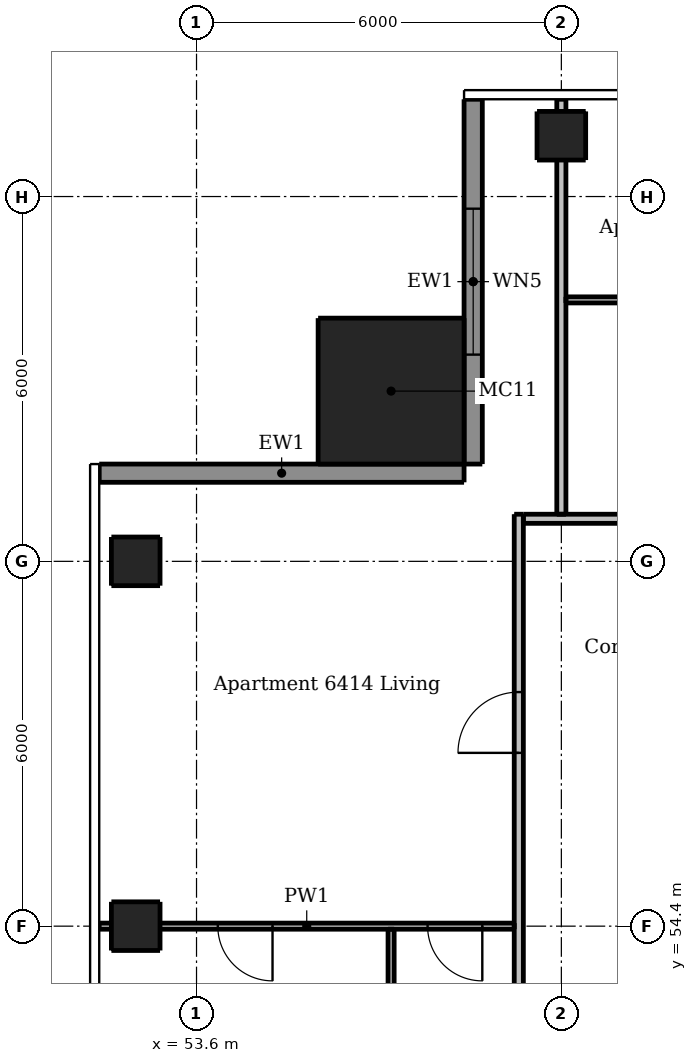
"""IFC4 building model, lengths in metres.
Left out: names, types, materials, properties, quantities, classifications, styles, units other than length and angle.
Written with IfcOpenShell. Run it as: python <this file> out.ifc"""

import sys

from ifc_helpers import new_model, si_unit, direction, frame, frame_2d, origin, origin_2d, place, context, subcontext, project, spatial, rectangle, extrude, element, fill, save


model = new_model("IFC4")
c1 = context("Model", 3, precision=1e-05, world=origin(), true_north=direction((0.0, 1.0)))
c2 = subcontext(c1, "Body", "Model", "MODEL_VIEW")
j1 = project(units=[si_unit("LENGTHUNIT", "METRE"), si_unit("PLANEANGLEUNIT", "RADIAN")], contexts=[c1])
p1 = place(None, origin())
s1 = spatial("IfcSite", under=j1, at=p1, CompositionType="ELEMENT")
p2 = place(p1, origin())
s2 = spatial("IfcBuilding", under=s1, at=p2, CompositionType="ELEMENT")
p3 = place(p2, frame((0.0, 0.0, 242.2)))
s3 = spatial("IfcBuildingStorey", under=s2, at=p3, CompositionType="ELEMENT", Elevation=242.2)
for number, where, z_axis, x_axis in (
    (1, (59.6, 67.4, 0.0), (0.0, 0.0, 1.0), (1.0, 0.0, 0.0)),
    (2, (52.6, 54.4, 0.0), (0.0, 0.0, 1.0), (1.0, 0.0, 0.0)),
    (3, (52.6, 60.4, 0.0), (0.0, 0.0, 1.0), (1.0, 0.0, 0.0)),
):
    element("IfcColumn", number, at=place(p3, frame(where, z_axis=z_axis, x_axis=x_axis)), inside=s3, PredefinedType="COLUMN", context=c2, shape_type="SweptSolid", body=[
        extrude(rectangle(XDim=0.8, YDim=0.8, at=origin_2d()), origin(), (0.0, 0.0, 1.0), 3.05),
    ])
p4 = place(p3, frame((56.8, 63.2, 0.0), z_axis=(0.0, 0.0, 1.0), x_axis=(1.0, 0.0, 0.0)))
e4 = element("IfcColumn", 4, at=p4, inside=s3, PredefinedType="COLUMN", context=c2, shape_type="SweptSolid", body=[
    extrude(rectangle(XDim=2.4, YDim=2.4, at=origin_2d()), origin(), (0.0, 0.0, 1.0), 3.3),
])
p5 = place(p3, frame((58.15, 68.0, 0.0), z_axis=(0.0, 0.0, 1.0), x_axis=(0.0, -1.0, 0.0)))
e5 = element("IfcWall", 5, at=p5, inside=s3, PredefinedType="SOLIDWALL", context=c2, shape_type="SweptSolid", body=[
    extrude(rectangle(XDim=6.0, YDim=0.3, at=frame_2d((3.0, 0.0))), origin(), (0.0, 0.0, 1.0), 3.05),
])
p6 = place(p5, frame((1.8, 0.0, 0.15)))
e6 = element("IfcOpeningElement", 6, at=p6, cuts=e5, PredefinedType="OPENING", context=c2, shape_type="SweptSolid", body=[
    extrude(rectangle(XDim=2.4, YDim=2.1, at=frame_2d((1.2, 1.05))), frame((0.0, 0.16, 0.0), z_axis=(0.0, -1.0, 0.0), x_axis=(1.0, 0.0, 0.0)), (0.0, 0.0, 1.0), 0.32),
])
p7 = place(p3, frame((58.0, 61.85, 0.0), z_axis=(0.0, 0.0, 1.0), x_axis=(-1.0, 0.0, 0.0)))
e7 = element("IfcWall", 7, at=p7, inside=s3, PredefinedType="SOLIDWALL", context=c2, shape_type="SweptSolid", body=[
    extrude(rectangle(XDim=6.0, YDim=0.3, at=frame_2d((3.0, 0.0))), origin(), (0.0, 0.0, 1.0), 3.05),
])
p8 = place(p3, frame((56.8, 54.35, 0.0), z_axis=(0.0, 0.0, 1.0), x_axis=(0.0, -1.0, 0.0)))
e8 = element("IfcWall", 8, at=p8, inside=s3, PredefinedType="PARTITIONING", context=c2, shape_type="SweptSolid", body=[
    extrude(rectangle(XDim=5.875, YDim=0.1, at=frame_2d((2.938, 0.0))), origin(), (0.0, 0.0, 1.0), 3.05),
])
p9 = place(p8, frame((3.75, 0.0, 0.0)))
e9 = element("IfcOpeningElement", 9, at=p9, cuts=e8, PredefinedType="OPENING", context=c2, shape_type="SweptSolid", body=[
    extrude(rectangle(XDim=0.8, YDim=2.1, at=frame_2d((0.4, 1.05))), frame((0.0, 0.06, 0.0), z_axis=(0.0, -1.0, 0.0), x_axis=(1.0, 0.0, 0.0)), (0.0, 0.0, 1.0), 0.12),
])
p10 = place(p3, frame((59.675, 64.7, 0.0), z_axis=(0.0, 0.0, 1.0), x_axis=(1.0, 0.0, 0.0)))
e10 = element("IfcWall", 10, at=p10, inside=s3, PredefinedType="PARTITIONING", context=c2, shape_type="SweptSolid", body=[
    extrude(rectangle(XDim=1.975, YDim=0.1, at=frame_2d((0.987, 0.0))), origin(), (0.0, 0.0, 1.0), 3.05),
])
p11 = place(p3, frame((58.825, 54.4, 0.0), z_axis=(0.0, 0.0, 1.0), x_axis=(-1.0, 0.0, 0.0)))
e11 = element("IfcWall", 11, at=p11, inside=s3, PredefinedType="PARTITIONING", context=c2, shape_type="SweptSolid", body=[
    extrude(rectangle(XDim=6.825, YDim=0.1, at=frame_2d((3.413, 0.0))), origin(), (0.0, 0.0, 1.0), 2.516),
])
p12 = place(p11, frame((0.525, 0.0, 0.0)))
e12 = element("IfcOpeningElement", 12, at=p12, cuts=e11, PredefinedType="OPENING", context=c2, shape_type="SweptSolid", body=[
    extrude(rectangle(XDim=0.9, YDim=2.1, at=frame_2d((0.45, 1.05))), frame((0.0, 0.06, 0.0), z_axis=(0.0, -1.0, 0.0), x_axis=(1.0, 0.0, 0.0)), (0.0, 0.0, 1.0), 0.12),
])
p13 = place(p11, frame((3.975, 0.0, 0.0)))
e13 = element("IfcOpeningElement", 13, at=p13, cuts=e11, PredefinedType="OPENING", context=c2, shape_type="SweptSolid", body=[
    extrude(rectangle(XDim=0.9, YDim=2.1, at=frame_2d((0.45, 1.05))), frame((0.0, 0.06, 0.0), z_axis=(0.0, -1.0, 0.0), x_axis=(1.0, 0.0, 0.0)), (0.0, 0.0, 1.0), 0.12),
])
p14 = place(p3, frame((58.9, 30.325, 0.0), z_axis=(0.0, 0.0, 1.0), x_axis=(0.0, 1.0, 0.0)))
e14 = element("IfcWall", 14, at=p14, inside=s3, PredefinedType="PARTITIONING", context=c2, shape_type="SweptSolid", body=[
    extrude(rectangle(XDim=30.85, YDim=0.15, at=frame_2d((15.425, 0.0))), origin(), (0.0, 0.0, 1.0), 3.05),
])
p15 = place(p14, frame((2.575, 0.0, 0.0)))
e15 = element("IfcOpeningElement", 15, at=p15, cuts=e14, PredefinedType="OPENING", context=c2, shape_type="SweptSolid", body=[
    extrude(rectangle(XDim=1.0, YDim=2.1, at=frame_2d((0.5, 1.05))), frame((0.0, 0.085, 0.0), z_axis=(0.0, -1.0, 0.0), x_axis=(1.0, 0.0, 0.0)), (0.0, 0.0, 1.0), 0.17),
])
p16 = place(p14, frame((8.575, 0.0, 0.0)))
e16 = element("IfcOpeningElement", 16, at=p16, cuts=e14, PredefinedType="OPENING", context=c2, shape_type="SweptSolid", body=[
    extrude(rectangle(XDim=1.0, YDim=2.1, at=frame_2d((0.5, 1.05))), frame((0.0, 0.085, 0.0), z_axis=(0.0, -1.0, 0.0), x_axis=(1.0, 0.0, 0.0)), (0.0, 0.0, 1.0), 0.17),
])
p17 = place(p14, frame((14.575, 0.0, 0.0)))
e17 = element("IfcOpeningElement", 17, at=p17, cuts=e14, PredefinedType="OPENING", context=c2, shape_type="SweptSolid", body=[
    extrude(rectangle(XDim=1.0, YDim=2.1, at=frame_2d((0.5, 1.05))), frame((0.0, 0.085, 0.0), z_axis=(0.0, -1.0, 0.0), x_axis=(1.0, 0.0, 0.0)), (0.0, 0.0, 1.0), 0.17),
])
p18 = place(p14, frame((26.925, 0.0, 0.0)))
e18 = element("IfcOpeningElement", 18, at=p18, cuts=e14, PredefinedType="OPENING", context=c2, shape_type="SweptSolid", body=[
    extrude(rectangle(XDim=1.0, YDim=2.1, at=frame_2d((0.5, 1.05))), frame((0.0, 0.085, 0.0), z_axis=(0.0, -1.0, 0.0), x_axis=(1.0, 0.0, 0.0)), (0.0, 0.0, 1.0), 0.17),
])
p19 = place(p3, frame((59.6, 61.175, 0.0), z_axis=(0.0, 0.0, 1.0), x_axis=(0.0, 1.0, 0.0)))
e19 = element("IfcWall", 19, at=p19, inside=s3, PredefinedType="PARTITIONING", context=c2, shape_type="SweptSolid", body=[
    extrude(rectangle(XDim=6.825, YDim=0.15, at=frame_2d((3.413, 0.0))), origin(), (0.0, 0.0, 1.0), 2.51),
])
p20 = place(p3, frame((58.975, 61.1, 0.0), z_axis=(0.0, 0.0, 1.0), x_axis=(1.0, 0.0, 0.0)))
e20 = element("IfcWall", 20, at=p20, inside=s3, PredefinedType="PARTITIONING", context=c2, shape_type="SweptSolid", body=[
    extrude(rectangle(XDim=29.25, YDim=0.15, at=frame_2d((14.625, 0.0))), origin(), (0.0, 0.0, 1.0), 3.05),
])
p21 = place(p20, frame((3.125, 0.0, 0.0)))
e21 = element("IfcOpeningElement", 21, at=p21, cuts=e20, PredefinedType="OPENING", context=c2, shape_type="SweptSolid", body=[
    extrude(rectangle(XDim=1.0, YDim=2.1, at=frame_2d((0.5, 1.05))), frame((0.0, 0.085, 0.0), z_axis=(0.0, -1.0, 0.0), x_axis=(1.0, 0.0, 0.0)), (0.0, 0.0, 1.0), 0.17),
])
p22 = place(p20, frame((13.925, 0.0, 0.0)))
e22 = element("IfcOpeningElement", 22, at=p22, cuts=e20, PredefinedType="OPENING", context=c2, shape_type="SweptSolid", body=[
    extrude(rectangle(XDim=1.0, YDim=2.1, at=frame_2d((0.5, 1.05))), frame((0.0, 0.085, 0.0), z_axis=(0.0, -1.0, 0.0), x_axis=(1.0, 0.0, 0.0)), (0.0, 0.0, 1.0), 0.17),
])
p23 = place(p20, frame((26.475, 0.0, 0.0)))
e23 = element("IfcOpeningElement", 23, at=p23, cuts=e20, PredefinedType="OPENING", context=c2, shape_type="SweptSolid", body=[
    extrude(rectangle(XDim=1.0, YDim=2.1, at=frame_2d((0.5, 1.05))), frame((0.0, 0.085, 0.0), z_axis=(0.0, -1.0, 0.0), x_axis=(1.0, 0.0, 0.0)), (0.0, 0.0, 1.0), 0.17),
])
p24 = place(p6, origin())
e24 = element("IfcWindow", 24, at=p24, inside=s3, PartitioningType="DOUBLE_PANEL_VERTICAL", PredefinedType="WINDOW", context=c2, shape_type="SweptSolid", body=[
    extrude(rectangle(XDim=2.4, YDim=2.1, at=frame_2d((1.2, 1.05))), frame((0.0, 0.03, 0.0), z_axis=(0.0, -1.0, 0.0), x_axis=(1.0, 0.0, 0.0)), (0.0, 0.0, 1.0), 0.06),
])
fill(e6, e24)
p25 = place(p18, origin())
e25 = element("IfcDoor", 25, at=p25, inside=s3, OperationType="SINGLE_SWING_LEFT", PredefinedType="DOOR", context=c2, shape_type="SweptSolid", body=[
    extrude(rectangle(XDim=1.0, YDim=2.1, at=frame_2d((0.5, 1.05))), frame((0.0, 0.025, 0.0), z_axis=(0.0, -1.0, 0.0), x_axis=(1.0, 0.0, 0.0)), (0.0, 0.0, 1.0), 0.05),
])
fill(e18, e25)
p26 = place(p12, origin())
e26 = element("IfcDoor", 26, at=p26, inside=s3, OperationType="SINGLE_SWING_LEFT", PredefinedType="DOOR", context=c2, shape_type="SweptSolid", body=[
    extrude(rectangle(XDim=0.9, YDim=2.1, at=frame_2d((0.45, 1.05))), frame((0.0, 0.025, 0.0), z_axis=(0.0, -1.0, 0.0), x_axis=(1.0, 0.0, 0.0)), (0.0, 0.0, 1.0), 0.05),
])
fill(e12, e26)
p27 = place(p13, origin())
e27 = element("IfcDoor", 27, at=p27, inside=s3, OperationType="SINGLE_SWING_LEFT", PredefinedType="DOOR", context=c2, shape_type="SweptSolid", body=[
    extrude(rectangle(XDim=0.9, YDim=2.1, at=frame_2d((0.45, 1.05))), frame((0.0, 0.025, 0.0), z_axis=(0.0, -1.0, 0.0), x_axis=(1.0, 0.0, 0.0)), (0.0, 0.0, 1.0), 0.05),
])
fill(e13, e27)
save(model, sys.argv[1])
